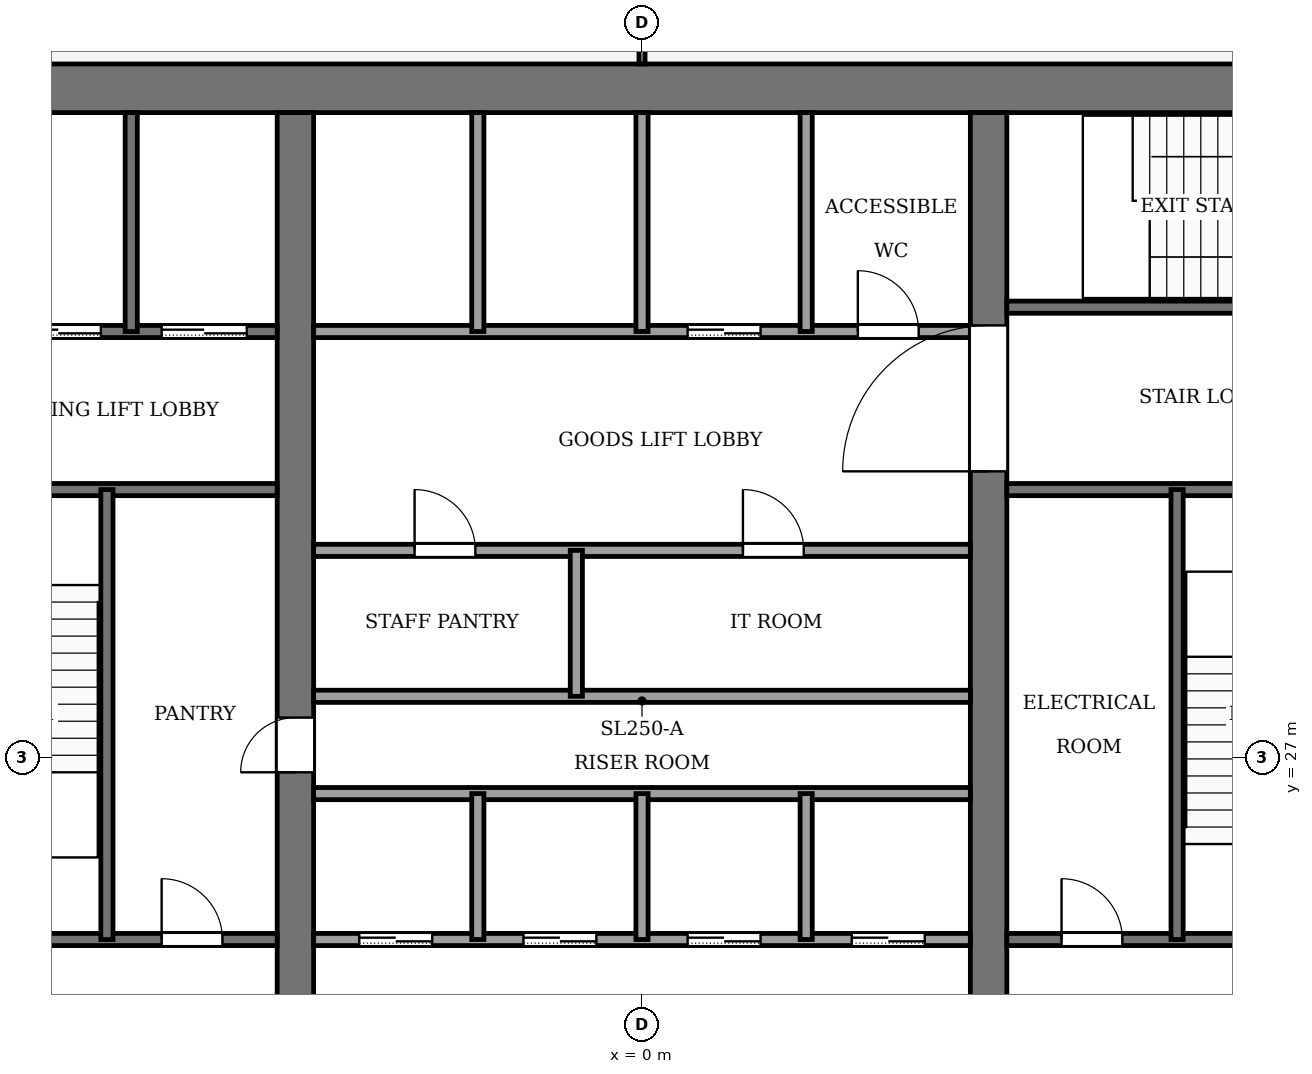
"""IFC4 building model, lengths in metres.
Left out: names, types, materials, properties, quantities, classifications, styles, units other than length and angle.
Written with IfcOpenShell. Run it as: python <this file> out.ifc"""

import sys

from ifc_helpers import new_model, si_unit, direction, frame, frame_2d, origin, place, context, subcontext, project, spatial, rectangle, extrude, element, fill, save


model = new_model("IFC4")
c1 = context("Model", 3, precision=1e-05, world=origin(), true_north=direction((0.0, 1.0)))
c2 = subcontext(c1, "Body", "Model", "MODEL_VIEW")
j1 = project(units=[si_unit("LENGTHUNIT", "METRE"), si_unit("PLANEANGLEUNIT", "RADIAN")], contexts=[c1])
p1 = place(None, origin())
s1 = spatial("IfcSite", under=j1, at=p1, CompositionType="ELEMENT")
p2 = place(p1, origin())
s2 = spatial("IfcBuilding", under=s1, at=p2, CompositionType="ELEMENT")
p3 = place(p2, frame((0.0, 0.0, 238.0)))
s3 = spatial("IfcBuildingStorey", under=s2, at=p3, CompositionType="ELEMENT", Elevation=238.0)
p4 = place(p3, frame((-13.4, 38.0, -0.13), z_axis=(0.0, 0.0, 1.0), x_axis=(1.0, 0.0, 0.0)))
e1 = element("IfcWall", 1, at=p4, inside=s3, PredefinedType="SHEAR", context=c2, shape_type="SweptSolid", body=[
    extrude(rectangle(XDim=26.8, YDim=0.8, at=frame_2d((13.4, 0.0))), origin(), (0.0, 0.0, 1.0), 4.0),
])
p5 = place(p3, frame((-5.7, 18.4, -0.13), z_axis=(0.0, 0.0, 1.0), x_axis=(0.0, 1.0, 0.0)))
e2 = element("IfcWall", 2, at=p5, inside=s3, PredefinedType="SHEAR", context=c2, shape_type="SweptSolid", body=[
    extrude(rectangle(XDim=19.2, YDim=0.6, at=frame_2d((9.6, 0.0))), origin(), (0.0, 0.0, 1.0), 4.0),
])
p6 = place(p5, frame((8.35, 0.0, 0.13)))
e3 = element("IfcOpeningElement", 3, at=p6, cuts=e2, PredefinedType="OPENING", context=c2, shape_type="SweptSolid", body=[
    extrude(rectangle(XDim=0.9, YDim=2.1, at=frame_2d((0.45, 1.05))), frame((0.0, 0.31, 0.0), z_axis=(0.0, -1.0, 0.0), x_axis=(1.0, 0.0, 0.0)), (0.0, 0.0, 1.0), 0.62),
])
p7 = place(p3, frame((5.7, 18.4, -0.13), z_axis=(0.0, 0.0, 1.0), x_axis=(0.0, 1.0, 0.0)))
e4 = element("IfcWall", 4, at=p7, inside=s3, PredefinedType="SHEAR", context=c2, shape_type="SweptSolid", body=[
    extrude(rectangle(XDim=19.2, YDim=0.6, at=frame_2d((9.6, 0.0))), origin(), (0.0, 0.0, 1.0), 4.0),
])
p8 = place(p7, frame((13.3, 0.0, 0.13)))
e5 = element("IfcOpeningElement", 5, at=p8, cuts=e4, PredefinedType="OPENING", context=c2, shape_type="SweptSolid", body=[
    extrude(rectangle(XDim=2.4, YDim=2.4, at=frame_2d((1.2, 1.2))), frame((0.0, 0.31, 0.0), z_axis=(0.0, -1.0, 0.0), x_axis=(1.0, 0.0, 0.0)), (0.0, 0.0, 1.0), 0.62),
])
p9 = place(p3, frame((-12.6, 24.0, 0.0), z_axis=(0.0, 0.0, 1.0), x_axis=(1.0, 0.0, 0.0)))
e6 = element("IfcWall", 6, at=p9, inside=s3, PredefinedType="PARTITIONING", context=c2, shape_type="SweptSolid", body=[
    extrude(rectangle(XDim=6.6, YDim=0.2, at=frame_2d((3.3, 0.0))), origin(), (0.0, 0.0, 1.0), 3.87),
])
p10 = place(p9, frame((4.7, 0.0, 0.0)))
e7 = element("IfcOpeningElement", 7, at=p10, cuts=e6, PredefinedType="OPENING", context=c2, shape_type="SweptSolid", body=[
    extrude(rectangle(XDim=1.0, YDim=2.1, at=frame_2d((0.5, 1.05))), frame((0.0, 0.11, 0.0), z_axis=(0.0, -1.0, 0.0), x_axis=(1.0, 0.0, 0.0)), (0.0, 0.0, 1.0), 0.22),
])
p11 = place(p3, frame((-5.4, 24.0, 0.0), z_axis=(0.0, 0.0, 1.0), x_axis=(1.0, 0.0, 0.0)))
e8 = element("IfcWall", 8, at=p11, inside=s3, PredefinedType="PARTITIONING", context=c2, shape_type="SweptSolid", body=[
    extrude(rectangle(XDim=10.8, YDim=0.2, at=frame_2d((5.4, 0.0))), origin(), (0.0, 0.0, 1.0), 3.87),
])
p12 = place(p11, frame((0.75, 0.0, 0.0)))
e9 = element("IfcOpeningElement", 9, at=p12, cuts=e8, PredefinedType="OPENING", context=c2, shape_type="SweptSolid", body=[
    extrude(rectangle(XDim=1.2, YDim=2.2, at=frame_2d((0.6, 1.1))), frame((0.0, 0.11, 0.0), z_axis=(0.0, -1.0, 0.0), x_axis=(1.0, 0.0, 0.0)), (0.0, 0.0, 1.0), 0.22),
])
p13 = place(p11, frame((3.45, 0.0, 0.0)))
e10 = element("IfcOpeningElement", 10, at=p13, cuts=e8, PredefinedType="OPENING", context=c2, shape_type="SweptSolid", body=[
    extrude(rectangle(XDim=1.2, YDim=2.2, at=frame_2d((0.6, 1.1))), frame((0.0, 0.11, 0.0), z_axis=(0.0, -1.0, 0.0), x_axis=(1.0, 0.0, 0.0)), (0.0, 0.0, 1.0), 0.22),
])
p14 = place(p11, frame((6.15, 0.0, 0.0)))
e11 = element("IfcOpeningElement", 11, at=p14, cuts=e8, PredefinedType="OPENING", context=c2, shape_type="SweptSolid", body=[
    extrude(rectangle(XDim=1.2, YDim=2.2, at=frame_2d((0.6, 1.1))), frame((0.0, 0.11, 0.0), z_axis=(0.0, -1.0, 0.0), x_axis=(1.0, 0.0, 0.0)), (0.0, 0.0, 1.0), 0.22),
])
p15 = place(p11, frame((8.85, 0.0, 0.0)))
e12 = element("IfcOpeningElement", 12, at=p15, cuts=e8, PredefinedType="OPENING", context=c2, shape_type="SweptSolid", body=[
    extrude(rectangle(XDim=1.2, YDim=2.2, at=frame_2d((0.6, 1.1))), frame((0.0, 0.11, 0.0), z_axis=(0.0, -1.0, 0.0), x_axis=(1.0, 0.0, 0.0)), (0.0, 0.0, 1.0), 0.22),
])
p16 = place(p3, frame((6.0, 24.0, 0.0), z_axis=(0.0, 0.0, 1.0), x_axis=(1.0, 0.0, 0.0)))
e13 = element("IfcWall", 13, at=p16, inside=s3, PredefinedType="PARTITIONING", context=c2, shape_type="SweptSolid", body=[
    extrude(rectangle(XDim=6.6, YDim=0.2, at=frame_2d((3.3, 0.0))), origin(), (0.0, 0.0, 1.0), 3.87),
])
p17 = place(p16, frame((0.9, 0.0, 0.0)))
e14 = element("IfcOpeningElement", 14, at=p17, cuts=e13, PredefinedType="OPENING", context=c2, shape_type="SweptSolid", body=[
    extrude(rectangle(XDim=1.0, YDim=2.1, at=frame_2d((0.5, 1.05))), frame((0.0, 0.11, 0.0), z_axis=(0.0, -1.0, 0.0), x_axis=(1.0, 0.0, 0.0)), (0.0, 0.0, 1.0), 0.22),
])
p18 = place(p16, frame((4.4, 0.0, 0.0)))
e15 = element("IfcOpeningElement", 15, at=p18, cuts=e13, PredefinedType="OPENING", context=c2, shape_type="SweptSolid", body=[
    extrude(rectangle(XDim=1.2, YDim=2.2, at=frame_2d((0.6, 1.1))), frame((0.0, 0.11, 0.0), z_axis=(0.0, -1.0, 0.0), x_axis=(1.0, 0.0, 0.0)), (0.0, 0.0, 1.0), 0.22),
])
for number, where, z_axis, x_axis in (
    (16, (-5.4, 26.4, 0.0), (0.0, 0.0, 1.0), (1.0, 0.0, 0.0)),
    (17, (-5.4, 28.0, 0.0), (0.0, 0.0, 1.0), (1.0, 0.0, 0.0)),
):
    element("IfcWall", number, at=place(p3, frame(where, z_axis=z_axis, x_axis=x_axis)), inside=s3, PredefinedType="PARTITIONING", context=c2, shape_type="SweptSolid", body=[
        extrude(rectangle(XDim=10.8, YDim=0.2, at=frame_2d((5.4, 0.0))), origin(), (0.0, 0.0, 1.0), 3.87),
    ])
p19 = place(p3, frame((-5.4, 30.4, 0.0), z_axis=(0.0, 0.0, 1.0), x_axis=(1.0, 0.0, 0.0)))
e18 = element("IfcWall", 18, at=p19, inside=s3, PredefinedType="PARTITIONING", context=c2, shape_type="SweptSolid", body=[
    extrude(rectangle(XDim=10.8, YDim=0.2, at=frame_2d((5.4, 0.0))), origin(), (0.0, 0.0, 1.0), 3.87),
])
p20 = place(p19, frame((1.66, 0.0, 0.0)))
e19 = element("IfcOpeningElement", 19, at=p20, cuts=e18, PredefinedType="OPENING", context=c2, shape_type="SweptSolid", body=[
    extrude(rectangle(XDim=1.0, YDim=2.1, at=frame_2d((0.5, 1.05))), frame((0.0, 0.11, 0.0), z_axis=(0.0, -1.0, 0.0), x_axis=(1.0, 0.0, 0.0)), (0.0, 0.0, 1.0), 0.22),
])
p21 = place(p19, frame((7.06, 0.0, 0.0)))
e20 = element("IfcOpeningElement", 20, at=p21, cuts=e18, PredefinedType="OPENING", context=c2, shape_type="SweptSolid", body=[
    extrude(rectangle(XDim=1.0, YDim=2.1, at=frame_2d((0.5, 1.05))), frame((0.0, 0.11, 0.0), z_axis=(0.0, -1.0, 0.0), x_axis=(1.0, 0.0, 0.0)), (0.0, 0.0, 1.0), 0.22),
])
p22 = place(p3, frame((-12.6, 31.4, 0.0), z_axis=(0.0, 0.0, 1.0), x_axis=(1.0, 0.0, 0.0)))
e21 = element("IfcWall", 21, at=p22, inside=s3, PredefinedType="PARTITIONING", context=c2, shape_type="SweptSolid", body=[
    extrude(rectangle(XDim=6.6, YDim=0.2, at=frame_2d((3.3, 0.0))), origin(), (0.0, 0.0, 1.0), 3.87),
])
p23 = place(p22, frame((1.0, 0.0, 0.0)))
e22 = element("IfcOpeningElement", 22, at=p23, cuts=e21, PredefinedType="OPENING", context=c2, shape_type="SweptSolid", body=[
    extrude(rectangle(XDim=1.2, YDim=2.2, at=frame_2d((0.6, 1.1))), frame((0.0, 0.11, 0.0), z_axis=(0.0, -1.0, 0.0), x_axis=(1.0, 0.0, 0.0)), (0.0, 0.0, 1.0), 0.22),
])
p24 = place(p3, frame((6.0, 31.4, 0.0), z_axis=(0.0, 0.0, 1.0), x_axis=(1.0, 0.0, 0.0)))
e23 = element("IfcWall", 23, at=p24, inside=s3, PredefinedType="PARTITIONING", context=c2, shape_type="SweptSolid", body=[
    extrude(rectangle(XDim=6.6, YDim=0.2, at=frame_2d((3.3, 0.0))), origin(), (0.0, 0.0, 1.0), 3.87),
])
p25 = place(p3, frame((-12.6, 34.0, 0.0), z_axis=(0.0, 0.0, 1.0), x_axis=(1.0, 0.0, 0.0)))
e24 = element("IfcWall", 24, at=p25, inside=s3, PredefinedType="PARTITIONING", context=c2, shape_type="SweptSolid", body=[
    extrude(rectangle(XDim=6.6, YDim=0.2, at=frame_2d((3.3, 0.0))), origin(), (0.0, 0.0, 1.0), 3.87),
])
p26 = place(p25, frame((4.7, 0.0, 0.0)))
e25 = element("IfcOpeningElement", 25, at=p26, cuts=e24, PredefinedType="OPENING", context=c2, shape_type="SweptSolid", body=[
    extrude(rectangle(XDim=1.4, YDim=2.2, at=frame_2d((0.7, 1.1))), frame((0.0, 0.11, 0.0), z_axis=(0.0, -1.0, 0.0), x_axis=(1.0, 0.0, 0.0)), (0.0, 0.0, 1.0), 0.22),
])
p27 = place(p25, frame((2.3, 0.0, 0.0)))
e26 = element("IfcOpeningElement", 26, at=p27, cuts=e24, PredefinedType="OPENING", context=c2, shape_type="SweptSolid", body=[
    extrude(rectangle(XDim=1.4, YDim=2.2, at=frame_2d((0.7, 1.1))), frame((0.0, 0.11, 0.0), z_axis=(0.0, -1.0, 0.0), x_axis=(1.0, 0.0, 0.0)), (0.0, 0.0, 1.0), 0.22),
])
p28 = place(p25, frame((0.45, 0.0, 0.0)))
e27 = element("IfcOpeningElement", 27, at=p28, cuts=e24, PredefinedType="OPENING", context=c2, shape_type="SweptSolid", body=[
    extrude(rectangle(XDim=0.9, YDim=2.1, at=frame_2d((0.45, 1.05))), frame((0.0, 0.11, 0.0), z_axis=(0.0, -1.0, 0.0), x_axis=(1.0, 0.0, 0.0)), (0.0, 0.0, 1.0), 0.22),
])
p29 = place(p3, frame((-5.4, 34.0, 0.0), z_axis=(0.0, 0.0, 1.0), x_axis=(1.0, 0.0, 0.0)))
e28 = element("IfcWall", 28, at=p29, inside=s3, PredefinedType="PARTITIONING", context=c2, shape_type="SweptSolid", body=[
    extrude(rectangle(XDim=10.8, YDim=0.2, at=frame_2d((5.4, 0.0))), origin(), (0.0, 0.0, 1.0), 3.87),
])
p30 = place(p29, frame((6.15, 0.0, 0.0)))
e29 = element("IfcOpeningElement", 29, at=p30, cuts=e28, PredefinedType="OPENING", context=c2, shape_type="SweptSolid", body=[
    extrude(rectangle(XDim=1.2, YDim=2.2, at=frame_2d((0.6, 1.1))), frame((0.0, 0.11, 0.0), z_axis=(0.0, -1.0, 0.0), x_axis=(1.0, 0.0, 0.0)), (0.0, 0.0, 1.0), 0.22),
])
p31 = place(p29, frame((8.95, 0.0, 0.0)))
e30 = element("IfcOpeningElement", 30, at=p31, cuts=e28, PredefinedType="OPENING", context=c2, shape_type="SweptSolid", body=[
    extrude(rectangle(XDim=1.0, YDim=2.1, at=frame_2d((0.5, 1.05))), frame((0.0, 0.11, 0.0), z_axis=(0.0, -1.0, 0.0), x_axis=(1.0, 0.0, 0.0)), (0.0, 0.0, 1.0), 0.22),
])
p32 = place(p3, frame((6.0, 34.4, 0.0), z_axis=(0.0, 0.0, 1.0), x_axis=(1.0, 0.0, 0.0)))
e31 = element("IfcWall", 31, at=p32, inside=s3, PredefinedType="PARTITIONING", context=c2, shape_type="SweptSolid", body=[
    extrude(rectangle(XDim=6.6, YDim=0.2, at=frame_2d((3.3, 0.0))), origin(), (0.0, 0.0, 1.0), 3.87),
])
p33 = place(p32, frame((4.8, 0.0, 0.0)))
e32 = element("IfcOpeningElement", 32, at=p33, cuts=e31, PredefinedType="OPENING", context=c2, shape_type="SweptSolid", body=[
    extrude(rectangle(XDim=1.2, YDim=2.2, at=frame_2d((0.6, 1.1))), frame((0.0, 0.11, 0.0), z_axis=(0.0, -1.0, 0.0), x_axis=(1.0, 0.0, 0.0)), (0.0, 0.0, 1.0), 0.22),
])
p34 = place(p3, frame((-8.8, 24.0, 0.0), z_axis=(0.0, 0.0, 1.0), x_axis=(0.0, 1.0, 0.0)))
e33 = element("IfcWall", 33, at=p34, inside=s3, PredefinedType="PARTITIONING", context=c2, shape_type="SweptSolid", body=[
    extrude(rectangle(XDim=7.4, YDim=0.2, at=frame_2d((3.7, 0.0))), origin(), (0.0, 0.0, 1.0), 3.87),
])
p35 = place(p3, frame((-8.4, 34.0, 0.0), z_axis=(0.0, 0.0, 1.0), x_axis=(0.0, 1.0, 0.0)))
e34 = element("IfcWall", 34, at=p35, inside=s3, PredefinedType="PARTITIONING", context=c2, shape_type="SweptSolid", body=[
    extrude(rectangle(XDim=3.6, YDim=0.2, at=frame_2d((1.8, 0.0))), origin(), (0.0, 0.0, 1.0), 3.87),
])
p36 = place(p3, frame((-2.7, 24.0, 0.0), z_axis=(0.0, 0.0, 1.0), x_axis=(0.0, 1.0, 0.0)))
e35 = element("IfcWall", 35, at=p36, inside=s3, PredefinedType="PARTITIONING", context=c2, shape_type="SweptSolid", body=[
    extrude(rectangle(XDim=2.4, YDim=0.2, at=frame_2d((1.2, 0.0))), origin(), (0.0, 0.0, 1.0), 3.87),
])
p37 = place(p3, frame((-2.7, 34.0, 0.0), z_axis=(0.0, 0.0, 1.0), x_axis=(0.0, 1.0, 0.0)))
e36 = element("IfcWall", 36, at=p37, inside=s3, PredefinedType="PARTITIONING", context=c2, shape_type="SweptSolid", body=[
    extrude(rectangle(XDim=3.6, YDim=0.2, at=frame_2d((1.8, 0.0))), origin(), (0.0, 0.0, 1.0), 3.87),
])
for number, where, z_axis, x_axis in (
    (37, (-1.08, 28.0, 0.0), (0.0, 0.0, 1.0), (0.0, 1.0, 0.0)),
    (38, (0.0, 24.0, 0.0), (0.0, 0.0, 1.0), (0.0, 1.0, 0.0)),
):
    element("IfcWall", number, at=place(p3, frame(where, z_axis=z_axis, x_axis=x_axis)), inside=s3, PredefinedType="PARTITIONING", context=c2, shape_type="SweptSolid", body=[
        extrude(rectangle(XDim=2.4, YDim=0.2, at=frame_2d((1.2, 0.0))), origin(), (0.0, 0.0, 1.0), 3.87),
    ])
p38 = place(p3, frame((0.0, 34.0, 0.0), z_axis=(0.0, 0.0, 1.0), x_axis=(0.0, 1.0, 0.0)))
e39 = element("IfcWall", 39, at=p38, inside=s3, PredefinedType="PARTITIONING", context=c2, shape_type="SweptSolid", body=[
    extrude(rectangle(XDim=3.6, YDim=0.2, at=frame_2d((1.8, 0.0))), origin(), (0.0, 0.0, 1.0), 3.87),
])
p39 = place(p3, frame((2.7, 24.0, 0.0), z_axis=(0.0, 0.0, 1.0), x_axis=(0.0, 1.0, 0.0)))
e40 = element("IfcWall", 40, at=p39, inside=s3, PredefinedType="PARTITIONING", context=c2, shape_type="SweptSolid", body=[
    extrude(rectangle(XDim=2.4, YDim=0.2, at=frame_2d((1.2, 0.0))), origin(), (0.0, 0.0, 1.0), 3.87),
])
p40 = place(p3, frame((2.7, 34.0, 0.0), z_axis=(0.0, 0.0, 1.0), x_axis=(0.0, 1.0, 0.0)))
e41 = element("IfcWall", 41, at=p40, inside=s3, PredefinedType="PARTITIONING", context=c2, shape_type="SweptSolid", body=[
    extrude(rectangle(XDim=3.6, YDim=0.2, at=frame_2d((1.8, 0.0))), origin(), (0.0, 0.0, 1.0), 3.87),
])
p41 = place(p3, frame((8.8, 24.0, 0.0), z_axis=(0.0, 0.0, 1.0), x_axis=(0.0, 1.0, 0.0)))
e42 = element("IfcWall", 42, at=p41, inside=s3, PredefinedType="PARTITIONING", context=c2, shape_type="SweptSolid", body=[
    extrude(rectangle(XDim=7.4, YDim=0.2, at=frame_2d((3.7, 0.0))), origin(), (0.0, 0.0, 1.0), 3.87),
])
p42 = place(p3, frame((0.0, 38.4, 0.0), z_axis=(0.0, 0.0, 1.0), x_axis=(0.0, 1.0, 0.0)))
e43 = element("IfcWall", 43, at=p42, inside=s3, PredefinedType="PARTITIONING", context=c2, shape_type="SweptSolid", body=[
    extrude(rectangle(XDim=2.104, YDim=0.1, at=frame_2d((1.052, 0.0))), origin(), (0.0, 0.0, 1.0), 3.44),
])
p43 = place(p12, origin())
e44 = element("IfcDoor", 44, at=p43, inside=s3, OperationType="SLIDING_TO_LEFT", PredefinedType="DOOR", context=c2, shape_type="SweptSolid", body=[
    extrude(rectangle(XDim=1.2, YDim=2.2, at=frame_2d((0.6, 1.1))), frame((0.0, 0.025, 0.0), z_axis=(0.0, -1.0, 0.0), x_axis=(1.0, 0.0, 0.0)), (0.0, 0.0, 1.0), 0.05),
])
fill(e9, e44)
p44 = place(p13, origin())
e45 = element("IfcDoor", 45, at=p44, inside=s3, OperationType="SLIDING_TO_LEFT", PredefinedType="DOOR", context=c2, shape_type="SweptSolid", body=[
    extrude(rectangle(XDim=1.2, YDim=2.2, at=frame_2d((0.6, 1.1))), frame((0.0, 0.025, 0.0), z_axis=(0.0, -1.0, 0.0), x_axis=(1.0, 0.0, 0.0)), (0.0, 0.0, 1.0), 0.05),
])
fill(e10, e45)
p45 = place(p14, origin())
e46 = element("IfcDoor", 46, at=p45, inside=s3, OperationType="SLIDING_TO_LEFT", PredefinedType="DOOR", context=c2, shape_type="SweptSolid", body=[
    extrude(rectangle(XDim=1.2, YDim=2.2, at=frame_2d((0.6, 1.1))), frame((0.0, 0.025, 0.0), z_axis=(0.0, -1.0, 0.0), x_axis=(1.0, 0.0, 0.0)), (0.0, 0.0, 1.0), 0.05),
])
fill(e11, e46)
p46 = place(p15, origin())
e47 = element("IfcDoor", 47, at=p46, inside=s3, OperationType="SLIDING_TO_LEFT", PredefinedType="DOOR", context=c2, shape_type="SweptSolid", body=[
    extrude(rectangle(XDim=1.2, YDim=2.2, at=frame_2d((0.6, 1.1))), frame((0.0, 0.025, 0.0), z_axis=(0.0, -1.0, 0.0), x_axis=(1.0, 0.0, 0.0)), (0.0, 0.0, 1.0), 0.05),
])
fill(e12, e47)
p47 = place(p30, origin())
e48 = element("IfcDoor", 48, at=p47, inside=s3, OperationType="SLIDING_TO_LEFT", PredefinedType="DOOR", context=c2, shape_type="SweptSolid", body=[
    extrude(rectangle(XDim=1.2, YDim=2.2, at=frame_2d((0.6, 1.1))), frame((0.0, 0.025, 0.0), z_axis=(0.0, -1.0, 0.0), x_axis=(1.0, 0.0, 0.0)), (0.0, 0.0, 1.0), 0.05),
])
fill(e29, e48)
p48 = place(p26, origin())
e49 = element("IfcDoor", 49, at=p48, inside=s3, OperationType="SLIDING_TO_LEFT", PredefinedType="DOOR", context=c2, shape_type="SweptSolid", body=[
    extrude(rectangle(XDim=1.4, YDim=2.2, at=frame_2d((0.7, 1.1))), frame((0.0, 0.025, 0.0), z_axis=(0.0, -1.0, 0.0), x_axis=(1.0, 0.0, 0.0)), (0.0, 0.0, 1.0), 0.05),
])
fill(e25, e49)
p49 = place(p27, origin())
e50 = element("IfcDoor", 50, at=p49, inside=s3, OperationType="SLIDING_TO_LEFT", PredefinedType="DOOR", context=c2, shape_type="SweptSolid", body=[
    extrude(rectangle(XDim=1.4, YDim=2.2, at=frame_2d((0.7, 1.1))), frame((0.0, 0.025, 0.0), z_axis=(0.0, -1.0, 0.0), x_axis=(1.0, 0.0, 0.0)), (0.0, 0.0, 1.0), 0.05),
])
fill(e26, e50)
p50 = place(p20, origin())
e51 = element("IfcDoor", 51, at=p50, inside=s3, OperationType="SINGLE_SWING_RIGHT", PredefinedType="DOOR", context=c2, shape_type="SweptSolid", body=[
    extrude(rectangle(XDim=1.0, YDim=2.1, at=frame_2d((0.5, 1.05))), frame((0.0, 0.025, 0.0), z_axis=(0.0, -1.0, 0.0), x_axis=(1.0, 0.0, 0.0)), (0.0, 0.0, 1.0), 0.05),
])
fill(e19, e51)
p51 = place(p21, origin())
e52 = element("IfcDoor", 52, at=p51, inside=s3, OperationType="SINGLE_SWING_LEFT", PredefinedType="DOOR", context=c2, shape_type="SweptSolid", body=[
    extrude(rectangle(XDim=1.0, YDim=2.1, at=frame_2d((0.5, 1.05))), frame((0.0, 0.025, 0.0), z_axis=(0.0, -1.0, 0.0), x_axis=(1.0, 0.0, 0.0)), (0.0, 0.0, 1.0), 0.05),
])
fill(e20, e52)
p52 = place(p10, origin())
e53 = element("IfcDoor", 53, at=p52, inside=s3, OperationType="SINGLE_SWING_RIGHT", PredefinedType="DOOR", context=c2, shape_type="SweptSolid", body=[
    extrude(rectangle(XDim=1.0, YDim=2.1, at=frame_2d((0.5, 1.05))), frame((0.0, 0.025, 0.0), z_axis=(0.0, -1.0, 0.0), x_axis=(1.0, 0.0, 0.0)), (0.0, 0.0, 1.0), 0.05),
])
fill(e7, e53)
p53 = place(p17, origin())
e54 = element("IfcDoor", 54, at=p53, inside=s3, OperationType="SINGLE_SWING_LEFT", PredefinedType="DOOR", context=c2, shape_type="SweptSolid", body=[
    extrude(rectangle(XDim=1.0, YDim=2.1, at=frame_2d((0.5, 1.05))), frame((0.0, 0.025, 0.0), z_axis=(0.0, -1.0, 0.0), x_axis=(1.0, 0.0, 0.0)), (0.0, 0.0, 1.0), 0.05),
])
fill(e14, e54)
p54 = place(p31, origin())
e55 = element("IfcDoor", 55, at=p54, inside=s3, OperationType="SINGLE_SWING_LEFT", PredefinedType="DOOR", context=c2, shape_type="SweptSolid", body=[
    extrude(rectangle(XDim=1.0, YDim=2.1, at=frame_2d((0.5, 1.05))), frame((0.0, 0.025, 0.0), z_axis=(0.0, -1.0, 0.0), x_axis=(1.0, 0.0, 0.0)), (0.0, 0.0, 1.0), 0.05),
])
fill(e30, e55)
p55 = place(p6, origin())
e56 = element("IfcDoor", 56, at=p55, inside=s3, OperationType="SINGLE_SWING_RIGHT", PredefinedType="DOOR", context=c2, shape_type="SweptSolid", body=[
    extrude(rectangle(XDim=0.9, YDim=2.1, at=frame_2d((0.45, 1.05))), frame((0.0, 0.025, 0.0), z_axis=(0.0, -1.0, 0.0), x_axis=(1.0, 0.0, 0.0)), (0.0, 0.0, 1.0), 0.05),
])
fill(e3, e56)
p56 = place(p8, origin())
e57 = element("IfcDoor", 57, at=p56, inside=s3, OperationType="DOUBLE_DOOR_SINGLE_SWING", PredefinedType="DOOR", context=c2, shape_type="SweptSolid", body=[
    extrude(rectangle(XDim=2.4, YDim=2.4, at=frame_2d((1.2, 1.2))), frame((0.0, 0.025, 0.0), z_axis=(0.0, -1.0, 0.0), x_axis=(1.0, 0.0, 0.0)), (0.0, 0.0, 1.0), 0.05),
])
fill(e5, e57)
save(model, sys.argv[1])
